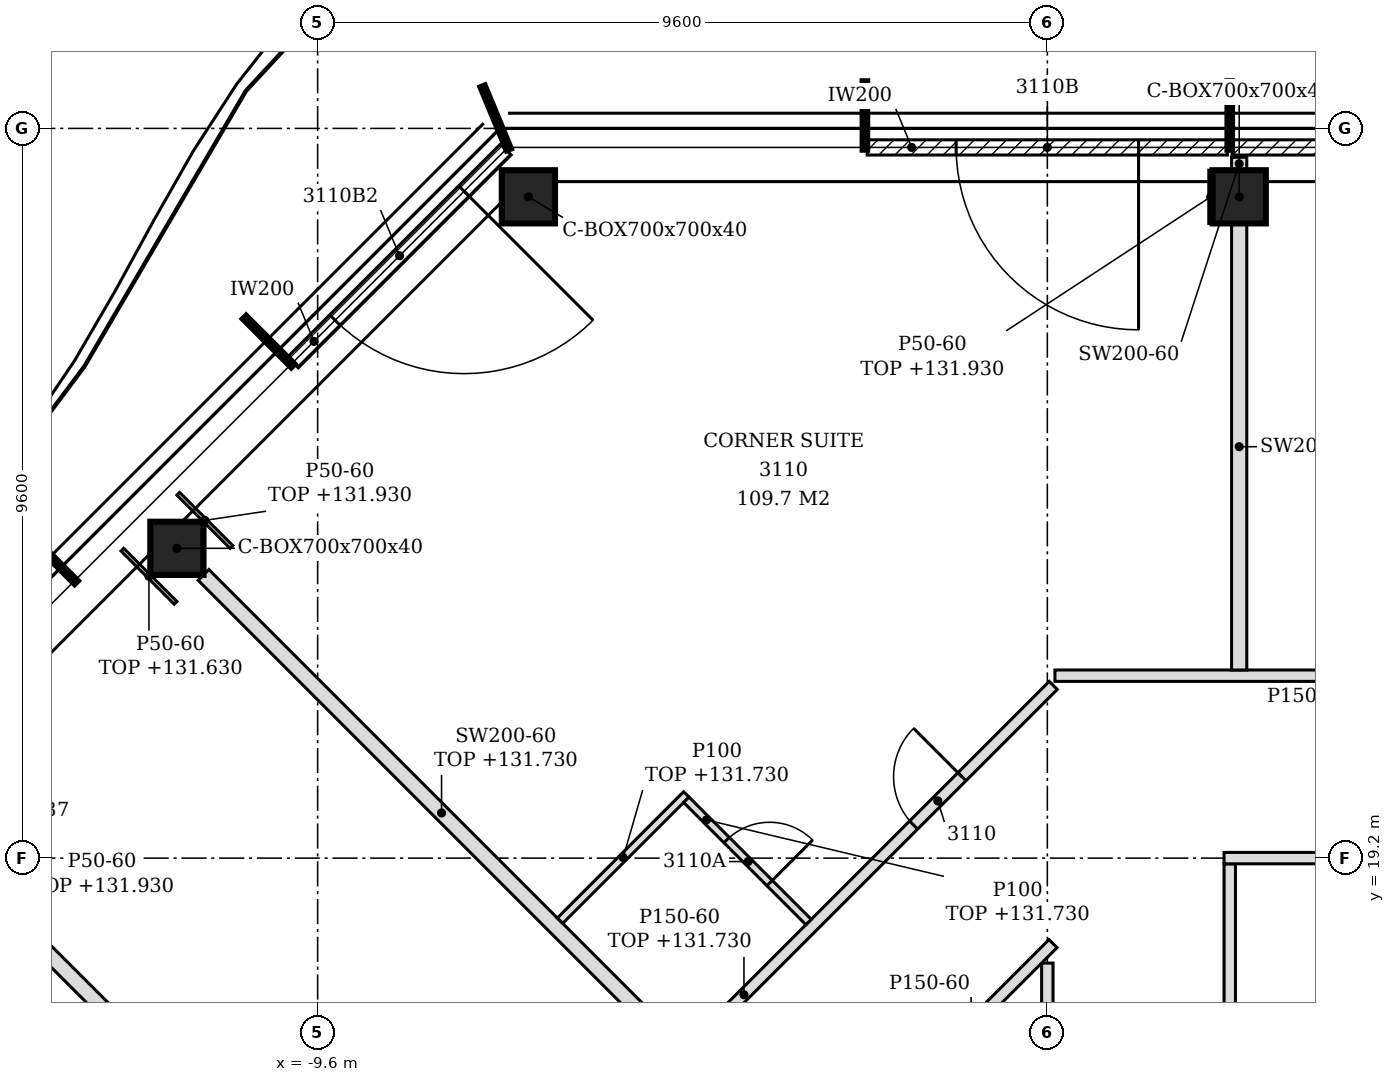
"""IFC4 building model, lengths in metres.
Left out: names, types, materials, properties, quantities, classifications, styles, units other than length and angle.
Written with IfcOpenShell. Run it as: python <this file> out.ifc"""

import sys

from ifc_helpers import new_model, si_unit, direction, frame, frame_2d, origin, origin_2d, place, context, subcontext, project, spatial, polyline, rectangle, hollow_rectangle, outline, extrude, element, fill, save


model = new_model("IFC4")
c1 = context("Model", 3, precision=1e-05, world=origin(), true_north=direction((0.0, 1.0)))
c2 = subcontext(c1, "Body", "Model", "MODEL_VIEW")
j1 = project(units=[si_unit("LENGTHUNIT", "METRE"), si_unit("PLANEANGLEUNIT", "RADIAN")], contexts=[c1])
p1 = place(None, origin())
s1 = spatial("IfcSite", under=j1, at=p1, CompositionType="ELEMENT")
p2 = place(p1, origin())
s2 = spatial("IfcBuilding", under=s1, at=p2, CompositionType="ELEMENT")
p3 = place(p2, frame((0.0, 0.0, 129.0)))
s3 = spatial("IfcBuildingStorey", under=s2, at=p3, CompositionType="ELEMENT", Elevation=129.0)
for number, where, z_axis, x_axis in (
    (1, (2.524, 27.9, -0.15), (0.0, 0.0, 1.0), (1.0, 0.0, 0.0)),
    (2, (-6.827, 27.9, -0.15), (0.0, 0.0, 1.0), (1.0, 0.0, 0.0)),
    (3, (-11.451, 23.276, -0.15), (0.0, 0.0, 1.0), (1.0, 0.0, 0.0)),
):
    element("IfcColumn", number, at=place(p3, frame(where, z_axis=z_axis, x_axis=x_axis)), inside=s3, PredefinedType="COLUMN", context=c2, shape_type="SweptSolid", body=[
        extrude(hollow_rectangle(XDim=0.7, YDim=0.7, WallThickness=0.04, at=origin_2d()), origin(), (0.0, 0.0, 1.0), 3.6),
    ])
p4 = place(p3, frame((7.17, 28.55, 0.0), z_axis=(0.0, 0.0, 1.0), x_axis=(-1.0, 0.0, 0.0)))
e4 = element("IfcWall", 4, at=p4, inside=s3, PredefinedType="NOTDEFINED", context=c2, shape_type="SweptSolid", body=[
    extrude(rectangle(XDim=4.74, YDim=0.2, at=frame_2d((2.37, 0.0))), origin(), (0.0, 0.0, 1.0), 3.45),
])
p5 = place(p4, frame((1.17, 0.0, 0.0)))
e5 = element("IfcOpeningElement", 5, at=p5, cuts=e4, PredefinedType="OPENING", context=c2, shape_type="SweptSolid", body=[
    extrude(rectangle(XDim=2.4, YDim=2.4, at=frame_2d((1.2, 1.2))), frame((0.0, 0.11, 0.0), z_axis=(0.0, -1.0, 0.0), x_axis=(1.0, 0.0, 0.0)), (0.0, 0.0, 1.0), 0.22),
])
p6 = place(p3, frame((2.37, 28.55, 0.0), z_axis=(0.0, 0.0, 1.0), x_axis=(-1.0, 0.0, 0.0)))
e6 = element("IfcWall", 6, at=p6, inside=s3, PredefinedType="NOTDEFINED", context=c2, shape_type="SweptSolid", body=[
    extrude(rectangle(XDim=4.74, YDim=0.2, at=frame_2d((2.37, 0.0))), origin(), (0.0, 0.0, 1.0), 3.45),
])
p7 = place(p6, frame((1.17, 0.0, 0.0)))
e7 = element("IfcOpeningElement", 7, at=p7, cuts=e6, PredefinedType="OPENING", context=c2, shape_type="SweptSolid", body=[
    extrude(rectangle(XDim=2.4, YDim=2.4, at=frame_2d((1.2, 1.2))), frame((0.0, 0.11, 0.0), z_axis=(0.0, -1.0, 0.0), x_axis=(1.0, 0.0, 0.0)), (0.0, 0.0, 1.0), 0.22),
])
p8 = place(p3, frame((-7.125, 28.522, 0.0), z_axis=(0.0, 0.0, 1.0), x_axis=(-0.707106781187, -0.707106781187, 0.0)))
e8 = element("IfcWall", 8, at=p8, inside=s3, PredefinedType="NOTDEFINED", context=c2, shape_type="SweptSolid", body=[
    extrude(rectangle(XDim=3.962, YDim=0.2, at=frame_2d((1.981, 0.0))), origin(), (0.0, 0.0, 1.0), 3.45),
])
p9 = place(p8, frame((0.775, 0.0, 0.0)))
e9 = element("IfcOpeningElement", 9, at=p9, cuts=e8, PredefinedType="OPENING", context=c2, shape_type="SweptSolid", body=[
    extrude(rectangle(XDim=2.4, YDim=2.4, at=frame_2d((1.2, 1.2))), frame((0.0, 0.11, 0.0), z_axis=(0.0, -1.0, 0.0), x_axis=(1.0, 0.0, 0.0)), (0.0, 0.0, 1.0), 0.22),
])
p10 = place(p3, frame((-14.475, 6.919, 0.0), z_axis=(0.0, 0.0, 1.0), x_axis=(0.707106781187, 0.707106781187, 0.0)))
e10 = element("IfcWall", 10, at=p10, inside=s3, PredefinedType="PARTITIONING", context=c2, shape_type="SweptSolid", body=[
    extrude(rectangle(XDim=20.581, YDim=0.15, at=frame_2d((10.291, 0.0))), origin(), (0.0, 0.0, 1.0), 2.73),
])
p11 = place(p10, frame((17.983, 0.0, 0.0)))
e11 = element("IfcOpeningElement", 11, at=p11, cuts=e10, PredefinedType="OPENING", context=c2, shape_type="SweptSolid", body=[
    extrude(rectangle(XDim=0.9, YDim=2.1, at=frame_2d((0.45, 1.05))), frame((0.0, 0.085, 0.0), z_axis=(0.0, -1.0, 0.0), x_axis=(1.0, 0.0, 0.0)), (0.0, 0.0, 1.0), 0.17),
])
p12 = place(p10, frame((10.77, 0.0, 0.0)))
e12 = element("IfcOpeningElement", 12, at=p12, cuts=e10, PredefinedType="OPENING", context=c2, shape_type="SweptSolid", body=[
    extrude(rectangle(XDim=0.9, YDim=2.1, at=frame_2d((0.45, 1.05))), frame((0.0, 0.085, 0.0), z_axis=(0.0, -1.0, 0.0), x_axis=(1.0, 0.0, 0.0)), (0.0, 0.0, 1.0), 0.17),
])
p13 = place(p10, frame((7.014, 0.0, 0.0)))
e13 = element("IfcOpeningElement", 13, at=p13, cuts=e10, PredefinedType="OPENING", context=c2, shape_type="SweptSolid", body=[
    extrude(rectangle(XDim=0.9, YDim=2.1, at=frame_2d((0.45, 1.05))), frame((0.0, 0.085, 0.0), z_axis=(0.0, -1.0, 0.0), x_axis=(1.0, 0.0, 0.0)), (0.0, 0.0, 1.0), 0.17),
])
p14 = place(p10, frame((1.499, 0.0, 0.0)))
e14 = element("IfcOpeningElement", 14, at=p14, cuts=e10, PredefinedType="OPENING", context=c2, shape_type="SweptSolid", body=[
    extrude(rectangle(XDim=0.9, YDim=2.1, at=frame_2d((0.45, 1.05))), frame((0.0, 0.085, 0.0), z_axis=(0.0, -1.0, 0.0), x_axis=(1.0, 0.0, 0.0)), (0.0, 0.0, 1.0), 0.17),
])
p15 = place(p3, frame((-8.35, 13.15, 0.0), z_axis=(0.0, 0.0, 1.0), x_axis=(-0.707092030896, 0.707121531169, 0.0)))
e15 = element("IfcWall", 15, at=p15, inside=s3, PredefinedType="PARTITIONING", context=c2, shape_type="SweptSolid", body=[
    extrude(rectangle(XDim=8.276, YDim=0.2, at=frame_2d((4.138, 0.0))), origin(), (0.0, 0.0, 1.0), 2.93),
])
p16 = place(p3, frame((0.0, 13.275, 0.0), z_axis=(0.0, 0.0, 1.0), x_axis=(0.0, 1.0, 0.0)))
e16 = element("IfcWall", 16, at=p16, inside=s3, PredefinedType="PARTITIONING", context=c2, shape_type="SweptSolid", body=[
    extrude(outline(polyline([(0.0, 0.0), (4.544, 0.0), (4.544, 3.45), (0.075, 3.45), (0.073, 2.83), (0.0, 2.83), (0.0, 0.0)])), frame((0.0, 0.075, 0.0), z_axis=(0.0, -1.0, 0.0), x_axis=(1.0, 0.0, 0.0)), (0.0, 0.0, 1.0), 0.15),
])
p17 = place(p3, frame((2.4, 13.275, 0.0), z_axis=(0.0, 0.0, 1.0), x_axis=(0.0, 1.0, 0.0)))
e17 = element("IfcWall", 17, at=p17, inside=s3, PredefinedType="PARTITIONING", context=c2, shape_type="SweptSolid", body=[
    extrude(outline(polyline([(0.0, 0.0), (5.85, 0.0), (5.85, 2.88), (5.82, 2.88), (5.818, 3.45), (0.075, 3.45), (0.073, 2.83), (0.0, 2.83), (0.0, 0.0)])), frame((0.0, 0.075, 0.0), z_axis=(0.0, -1.0, 0.0), x_axis=(1.0, 0.0, 0.0)), (0.0, 0.0, 1.0), 0.15),
])
p18 = place(p17, frame((1.025, 0.0, 0.0)))
e18 = element("IfcOpeningElement", 18, at=p18, cuts=e17, PredefinedType="OPENING", context=c2, shape_type="SweptSolid", body=[
    extrude(rectangle(XDim=0.8, YDim=2.1, at=frame_2d((0.4, 1.05))), frame((0.0, 0.085, 0.0), z_axis=(0.0, -1.0, 0.0), x_axis=(1.0, 0.0, 0.0)), (0.0, 0.0, 1.0), 0.17),
])
p19 = place(p3, frame((-4.592, 13.408, 0.0), z_axis=(0.0, 0.0, 1.0), x_axis=(0.707106781187, 0.707106781187, 0.0)))
e19 = element("IfcWall", 19, at=p19, inside=s3, PredefinedType="PARTITIONING", context=c2, shape_type="SweptSolid", body=[
    extrude(rectangle(XDim=6.599, YDim=0.15, at=frame_2d((3.3, 0.0))), origin(), (0.0, 0.0, 1.0), 3.45),
])
p20 = place(p19, frame((2.649, 0.0, 0.0)))
e20 = element("IfcOpeningElement", 20, at=p20, cuts=e19, PredefinedType="OPENING", context=c2, shape_type="SweptSolid", body=[
    extrude(rectangle(XDim=0.9, YDim=2.1, at=frame_2d((0.45, 1.05))), frame((0.0, 0.085, 0.0), z_axis=(0.0, -1.0, 0.0), x_axis=(1.0, 0.0, 0.0)), (0.0, 0.0, 1.0), 0.17),
])
p21 = place(p3, frame((-4.838, 16.662, 0.0), z_axis=(0.0, 0.0, 1.0), x_axis=(-0.707120561855, 0.707093000249, 0.0)))
e21 = element("IfcWall", 21, at=p21, inside=s3, PredefinedType="PARTITIONING", context=c2, shape_type="SweptSolid", body=[
    extrude(rectangle(XDim=8.858, YDim=0.2, at=frame_2d((4.429, 0.0))), origin(), (0.0, 0.0, 1.0), 2.73),
])
p22 = place(p3, frame((-6.411, 18.377, 0.0), z_axis=(0.0, 0.0, 1.0), x_axis=(0.707106781187, 0.707106781187, 0.0)))
e22 = element("IfcWall", 22, at=p22, inside=s3, PredefinedType="PARTITIONING", context=c2, shape_type="SweptSolid", body=[
    extrude(rectangle(XDim=2.35, YDim=0.1, at=frame_2d((1.175, 0.0))), origin(), (0.0, 0.0, 1.0), 2.73),
])
p23 = place(p3, frame((-3.141, 18.359, 0.0), z_axis=(0.0, 0.0, 1.0), x_axis=(-0.707053116953, 0.707160441348, 0.0)))
e23 = element("IfcWall", 23, at=p23, inside=s3, PredefinedType="PARTITIONING", context=c2, shape_type="SweptSolid", body=[
    extrude(rectangle(XDim=2.275, YDim=0.1, at=frame_2d((1.137, 0.0))), origin(), (0.0, 0.0, 1.0), 2.73),
])
p24 = place(p23, frame((0.725, 0.0, 0.0)))
e24 = element("IfcOpeningElement", 24, at=p24, cuts=e23, PredefinedType="OPENING", context=c2, shape_type="SweptSolid", body=[
    extrude(rectangle(XDim=0.8, YDim=2.1, at=frame_2d((0.4, 1.05))), frame((0.0, 0.06, 0.0), z_axis=(0.0, -1.0, 0.0), x_axis=(1.0, 0.0, 0.0)), (0.0, 0.0, 1.0), 0.12),
])
p25 = place(p3, frame((2.325, 19.2, 0.0), z_axis=(0.0, 0.0, 1.0), x_axis=(1.0, 0.0, 0.0)))
e25 = element("IfcWall", 25, at=p25, inside=s3, PredefinedType="PARTITIONING", context=c2, shape_type="SweptSolid", body=[
    extrude(outline(polyline([(0.0, 0.0), (10.981, 0.0), (10.981, 2.88), (5.025, 2.88), (5.023, 2.73), (4.725, 2.73), (4.723, 2.88), (0.0, 2.88), (0.0, 0.0)])), frame((0.0, 0.075, 0.0), z_axis=(0.0, -1.0, 0.0), x_axis=(1.0, 0.0, 0.0)), (0.0, 0.0, 1.0), 0.15),
])
p26 = place(p3, frame((0.1, 21.6, 0.0), z_axis=(0.0, 0.0, 1.0), x_axis=(1.0, 0.0, 0.0)))
e26 = element("IfcWall", 26, at=p26, inside=s3, PredefinedType="PARTITIONING", context=c2, shape_type="SweptSolid", body=[
    extrude(outline(polyline([(0.0, 0.0), (14.2, 0.0), (14.2, 3.45), (7.25, 3.45), (7.248, 2.73), (6.95, 2.73), (6.948, 3.45), (0.0, 3.45), (0.0, 0.0)])), frame((0.0, 0.075, 0.0), z_axis=(0.0, -1.0, 0.0), x_axis=(1.0, 0.0, 0.0)), (0.0, 0.0, 1.0), 0.15),
])
p27 = place(p26, frame((6.65, 0.0, 0.0)))
e27 = element("IfcOpeningElement", 27, at=p27, cuts=e26, PredefinedType="OPENING", context=c2, shape_type="SweptSolid", body=[
    extrude(rectangle(XDim=0.9, YDim=2.1, at=frame_2d((0.45, 1.05))), frame((0.0, 0.085, 0.0), z_axis=(0.0, -1.0, 0.0), x_axis=(1.0, 0.0, 0.0)), (0.0, 0.0, 1.0), 0.17),
])
p28 = place(p3, frame((2.524, 21.675, 0.0), z_axis=(0.0, 0.0, 1.0), x_axis=(0.0, 1.0, 0.0)))
e28 = element("IfcWall", 28, at=p28, inside=s3, PredefinedType="PARTITIONING", context=c2, shape_type="SweptSolid", body=[
    extrude(outline(polyline([(0.0, 0.0), (5.875, 0.0), (5.875, 3.45), (2.43, 3.45), (2.428, 2.88), (2.22, 2.88), (2.218, 3.45), (0.0, 3.45), (0.0, 0.0)])), frame((0.0, 0.1, 0.0), z_axis=(0.0, -1.0, 0.0), x_axis=(1.0, 0.0, 0.0)), (0.0, 0.0, 1.0), 0.2),
])
p29 = place(p3, frame((2.524, 28.25, 0.0), z_axis=(0.0, 0.0, 1.0), x_axis=(0.0, 1.0, 0.0)))
e29 = element("IfcWall", 29, at=p29, inside=s3, PredefinedType="PARTITIONING", context=c2, shape_type="SweptSolid", body=[
    extrude(rectangle(XDim=0.17, YDim=0.2, at=frame_2d((0.085, 0.0))), origin(), (0.0, 0.0, 1.0), 3.45),
])
p30 = place(p3, frame((-11.469, 22.558, 0.0), z_axis=(0.0, 0.0, 1.0), x_axis=(-0.707106781187, 0.707106781187, 0.0)))
e30 = element("IfcWall", 30, at=p30, inside=s3, PredefinedType="PARTITIONING", context=c2, shape_type="SweptSolid", body=[
    extrude(rectangle(XDim=0.99, YDim=0.05, at=frame_2d((0.495, 0.0))), origin(), (0.0, 0.0, 1.0), 2.63),
])
p31 = place(p3, frame((-10.734, 23.293, 0.0), z_axis=(0.0, 0.0, 1.0), x_axis=(-0.707106781187, 0.707106781187, 0.0)))
e31 = element("IfcWall", 31, at=p31, inside=s3, PredefinedType="PARTITIONING", context=c2, shape_type="SweptSolid", body=[
    extrude(rectangle(XDim=0.99, YDim=0.05, at=frame_2d((0.495, 0.0))), origin(), (0.0, 0.0, 1.0), 2.93),
])
p32 = place(p3, frame((2.149, 27.55, 0.0), z_axis=(0.0, 0.0, 1.0), x_axis=(0.0, 1.0, 0.0)))
e32 = element("IfcWall", 32, at=p32, inside=s3, PredefinedType="PARTITIONING", context=c2, shape_type="SweptSolid", body=[
    extrude(rectangle(XDim=0.7, YDim=0.05, at=frame_2d((0.35, 0.0))), origin(), (0.0, 0.0, 1.0), 2.93),
])
p33 = place(p7, origin())
e33 = element("IfcDoor", 33, at=p33, inside=s3, OperationType="SINGLE_SWING_LEFT", PredefinedType="DOOR", context=c2, shape_type="SweptSolid", body=[
    extrude(rectangle(XDim=2.4, YDim=2.4, at=frame_2d((1.2, 1.2))), frame((0.0, 0.025, 0.0), z_axis=(0.0, -1.0, 0.0), x_axis=(1.0, 0.0, 0.0)), (0.0, 0.0, 1.0), 0.05),
])
fill(e7, e33)
p34 = place(p9, origin())
e34 = element("IfcDoor", 34, at=p34, inside=s3, OperationType="SINGLE_SWING_LEFT", PredefinedType="DOOR", context=c2, shape_type="SweptSolid", body=[
    extrude(rectangle(XDim=2.4, YDim=2.4, at=frame_2d((1.2, 1.2))), frame((0.0, 0.025, 0.0), z_axis=(0.0, -1.0, 0.0), x_axis=(1.0, 0.0, 0.0)), (0.0, 0.0, 1.0), 0.05),
])
fill(e9, e34)
p35 = place(p11, origin())
e35 = element("IfcDoor", 35, at=p35, inside=s3, OperationType="SINGLE_SWING_RIGHT", PredefinedType="DOOR", context=c2, shape_type="SweptSolid", body=[
    extrude(rectangle(XDim=0.9, YDim=2.1, at=frame_2d((0.45, 1.05))), frame((0.0, 0.025, 0.0), z_axis=(0.0, -1.0, 0.0), x_axis=(1.0, 0.0, 0.0)), (0.0, 0.0, 1.0), 0.05),
])
fill(e11, e35)
p36 = place(p24, frame((0.8, 0.0, 0.0), z_axis=(0.0, 0.0, 1.0), x_axis=(-1.0, 0.0, 0.0)))
e36 = element("IfcDoor", 36, at=p36, inside=s3, OperationType="SINGLE_SWING_RIGHT", PredefinedType="DOOR", context=c2, shape_type="SweptSolid", body=[
    extrude(rectangle(XDim=0.8, YDim=2.1, at=frame_2d((0.4, 1.05))), frame((0.0, 0.025, 0.0), z_axis=(0.0, -1.0, 0.0), x_axis=(1.0, 0.0, 0.0)), (0.0, 0.0, 1.0), 0.05),
])
fill(e24, e36)
save(model, sys.argv[1])
